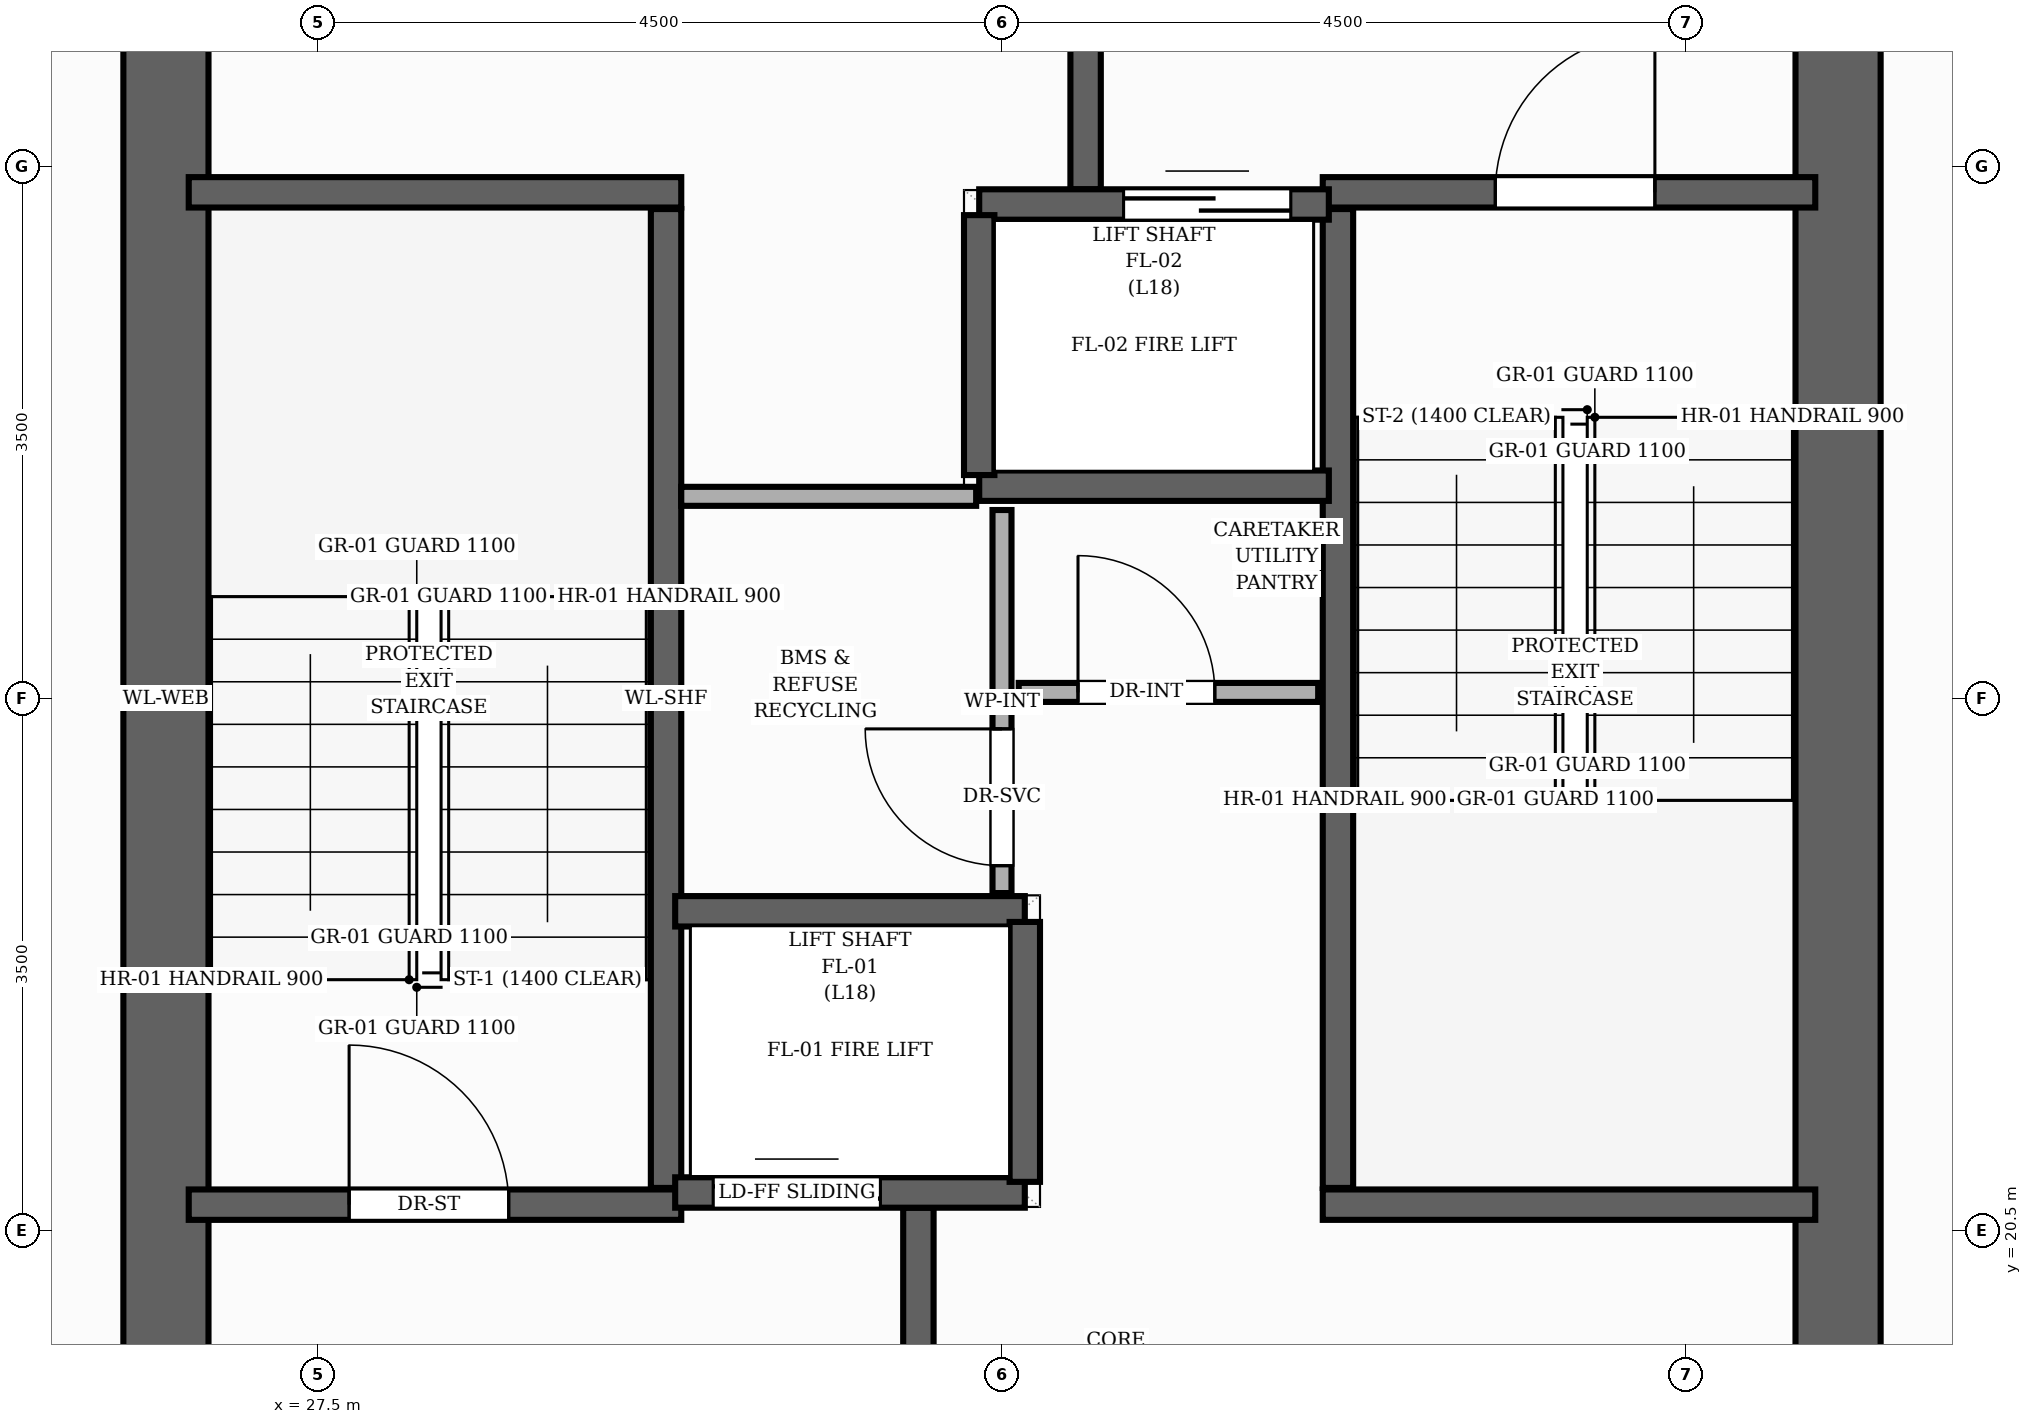
"""IFC4 building model, lengths in metres.
Left out: names, types, materials, properties, quantities, classifications, styles, units other than length and angle.
Written with IfcOpenShell. Run it as: python <this file> out.ifc"""

import sys

from ifc_helpers import new_model, si_unit, direction, frame, frame_2d, origin, place, context, subcontext, project, spatial, rectangle, extrude, element, fill, save


model = new_model("IFC4")
c1 = context("Model", 3, precision=1e-05, world=origin(), true_north=direction((0.0, 1.0)))
c2 = subcontext(c1, "Body", "Model", "MODEL_VIEW")
j1 = project(units=[si_unit("LENGTHUNIT", "METRE"), si_unit("PLANEANGLEUNIT", "RADIAN")], contexts=[c1])
p1 = place(None, origin())
s1 = spatial("IfcSite", under=j1, at=p1, CompositionType="ELEMENT")
p2 = place(p1, origin())
s2 = spatial("IfcBuilding", under=s1, at=p2, CompositionType="ELEMENT")
p3 = place(p2, frame((0.0, 0.0, 63.2)))
s3 = spatial("IfcBuildingStorey", under=s2, at=p3, CompositionType="ELEMENT", Elevation=63.2)
for number, where, z_axis, x_axis in (
    (1, (26.5, 17.4, 0.0), (0.0, 0.0, 1.0), (0.0, 1.0, 0.0)),
    (2, (37.5, 17.4, 0.0), (0.0, 0.0, 1.0), (0.0, 1.0, 0.0)),
):
    element("IfcWall", number, at=place(p3, frame(where, z_axis=z_axis, x_axis=x_axis)), inside=s3, PredefinedType="SHEAR", context=c2, shape_type="SweptSolid", body=[
        extrude(rectangle(XDim=13.2, YDim=0.56, at=frame_2d((6.6, 0.0))), origin(), (0.0, 0.0, 1.0), 3.2),
    ])
p4 = place(p3, frame((29.79, 20.78, 0.0), z_axis=(0.0, 0.0, 1.0), x_axis=(0.0, 1.0, 0.0)))
e3 = element("IfcWall", 3, at=p4, inside=s3, PredefinedType="SHEAR", context=c2, shape_type="SweptSolid", body=[
    extrude(rectangle(XDim=6.44, YDim=0.2, at=frame_2d((3.22, 0.0))), origin(), (0.0, 0.0, 1.0), 3.2),
])
p5 = place(p3, frame((26.65, 27.33, 0.0), z_axis=(0.0, 0.0, 1.0), x_axis=(1.0, 0.0, 0.0)))
e4 = element("IfcWall", 4, at=p5, inside=s3, PredefinedType="SHEAR", context=c2, shape_type="SweptSolid", body=[
    extrude(rectangle(XDim=3.24, YDim=0.2, at=frame_2d((1.62, 0.0))), origin(), (0.0, 0.0, 1.0), 3.2),
])
p6 = place(p3, frame((26.65, 20.67, 0.0), z_axis=(0.0, 0.0, 1.0), x_axis=(1.0, 0.0, 0.0)))
e5 = element("IfcWall", 5, at=p6, inside=s3, PredefinedType="SHEAR", context=c2, shape_type="SweptSolid", body=[
    extrude(rectangle(XDim=3.24, YDim=0.2, at=frame_2d((1.62, 0.0))), origin(), (0.0, 0.0, 1.0), 3.2),
])
p7 = place(p6, frame((1.055, 0.0, 0.0)))
e6 = element("IfcOpeningElement", 6, at=p7, cuts=e5, PredefinedType="OPENING", context=c2, shape_type="SweptSolid", body=[
    extrude(rectangle(XDim=1.05, YDim=2.15, at=frame_2d((0.525, 1.075))), frame((0.0, 0.11, 0.0), z_axis=(0.0, -1.0, 0.0), x_axis=(1.0, 0.0, 0.0)), (0.0, 0.0, 1.0), 0.22),
])
p8 = place(p3, frame((34.21, 20.78, 0.0), z_axis=(0.0, 0.0, 1.0), x_axis=(0.0, 1.0, 0.0)))
e7 = element("IfcWall", 7, at=p8, inside=s3, PredefinedType="SHEAR", context=c2, shape_type="SweptSolid", body=[
    extrude(rectangle(XDim=6.44, YDim=0.2, at=frame_2d((3.22, 0.0))), origin(), (0.0, 0.0, 1.0), 3.2),
])
p9 = place(p3, frame((34.11, 20.67, 0.0), z_axis=(0.0, 0.0, 1.0), x_axis=(1.0, 0.0, 0.0)))
e8 = element("IfcWall", 8, at=p9, inside=s3, PredefinedType="SHEAR", context=c2, shape_type="SweptSolid", body=[
    extrude(rectangle(XDim=3.24, YDim=0.2, at=frame_2d((1.62, 0.0))), origin(), (0.0, 0.0, 1.0), 3.2),
])
p10 = place(p3, frame((34.11, 27.33, 0.0), z_axis=(0.0, 0.0, 1.0), x_axis=(1.0, 0.0, 0.0)))
e9 = element("IfcWall", 9, at=p10, inside=s3, PredefinedType="SHEAR", context=c2, shape_type="SweptSolid", body=[
    extrude(rectangle(XDim=3.24, YDim=0.2, at=frame_2d((1.62, 0.0))), origin(), (0.0, 0.0, 1.0), 3.2),
])
p11 = place(p10, frame((1.135, 0.0, 0.0)))
e10 = element("IfcOpeningElement", 10, at=p11, cuts=e9, PredefinedType="OPENING", context=c2, shape_type="SweptSolid", body=[
    extrude(rectangle(XDim=1.05, YDim=2.15, at=frame_2d((0.525, 1.075))), frame((0.0, 0.11, 0.0), z_axis=(0.0, -1.0, 0.0), x_axis=(1.0, 0.0, 0.0)), (0.0, 0.0, 1.0), 0.22),
])
for number, where, z_axis, x_axis in (
    (11, (31.45, 17.15, 0.0), (0.0, 0.0, 1.0), (0.0, 1.0, 0.0)),
    (12, (32.55, 27.35, 0.0), (0.0, 0.0, 1.0), (0.0, 1.0, 0.0)),
):
    element("IfcWall", number, at=place(p3, frame(where, z_axis=z_axis, x_axis=x_axis)), inside=s3, PredefinedType="SHEAR", context=c2, shape_type="SweptSolid", body=[
        extrude(rectangle(XDim=3.5, YDim=0.2, at=frame_2d((1.75, 0.0))), origin(), (0.0, 0.0, 1.0), 3.2),
    ])
p12 = place(p3, frame((29.85, 20.75, 0.0), z_axis=(0.0, 0.0, 1.0), x_axis=(1.0, 0.0, 0.0)))
e13 = element("IfcWall", 13, at=p12, inside=s3, PredefinedType="SHEAR", context=c2, shape_type="SweptSolid", body=[
    extrude(rectangle(XDim=2.3, YDim=0.2, at=frame_2d((1.15, 0.0))), origin(), (0.0, 0.0, 1.0), 3.2),
])
p13 = place(p12, frame((0.25, 0.0, 0.0)))
e14 = element("IfcOpeningElement", 14, at=p13, cuts=e13, PredefinedType="OPENING", context=c2, shape_type="SweptSolid", body=[
    extrude(rectangle(XDim=1.1, YDim=2.15, at=frame_2d((0.55, 1.075))), frame((0.0, 0.11, 0.0), z_axis=(0.0, -1.0, 0.0), x_axis=(1.0, 0.0, 0.0)), (0.0, 0.0, 1.0), 0.22),
])
p14 = place(p3, frame((29.85, 22.6, 0.0), z_axis=(0.0, 0.0, 1.0), x_axis=(1.0, 0.0, 0.0)))
e15 = element("IfcWall", 15, at=p14, inside=s3, PredefinedType="SHEAR", context=c2, shape_type="SweptSolid", body=[
    extrude(rectangle(XDim=2.3, YDim=0.2, at=frame_2d((1.15, 0.0))), origin(), (0.0, 0.0, 1.0), 3.2),
])
p15 = place(p3, frame((32.15, 20.82, 0.0), z_axis=(0.0, 0.0, 1.0), x_axis=(0.0, 1.0, 0.0)))
e16 = element("IfcWall", 16, at=p15, inside=s3, PredefinedType="SHEAR", context=c2, shape_type="SweptSolid", body=[
    extrude(rectangle(XDim=1.71, YDim=0.2, at=frame_2d((0.855, 0.0))), origin(), (0.0, 0.0, 1.0), 3.2),
])
p16 = place(p3, frame((31.85, 27.25, 0.0), z_axis=(0.0, 0.0, 1.0), x_axis=(1.0, 0.0, 0.0)))
e17 = element("IfcWall", 17, at=p16, inside=s3, PredefinedType="SHEAR", context=c2, shape_type="SweptSolid", body=[
    extrude(rectangle(XDim=2.3, YDim=0.2, at=frame_2d((1.15, 0.0))), origin(), (0.0, 0.0, 1.0), 3.2),
])
p17 = place(p16, frame((0.95, 0.0, 0.0)))
e18 = element("IfcOpeningElement", 18, at=p17, cuts=e17, PredefinedType="OPENING", context=c2, shape_type="SweptSolid", body=[
    extrude(rectangle(XDim=1.1, YDim=2.15, at=frame_2d((0.55, 1.075))), frame((0.0, 0.11, 0.0), z_axis=(0.0, -1.0, 0.0), x_axis=(1.0, 0.0, 0.0)), (0.0, 0.0, 1.0), 0.22),
])
p18 = place(p3, frame((31.85, 25.4, 0.0), z_axis=(0.0, 0.0, 1.0), x_axis=(1.0, 0.0, 0.0)))
e19 = element("IfcWall", 19, at=p18, inside=s3, PredefinedType="SHEAR", context=c2, shape_type="SweptSolid", body=[
    extrude(rectangle(XDim=2.3, YDim=0.2, at=frame_2d((1.15, 0.0))), origin(), (0.0, 0.0, 1.0), 3.2),
])
p19 = place(p3, frame((31.85, 25.47, 0.0), z_axis=(0.0, 0.0, 1.0), x_axis=(0.0, 1.0, 0.0)))
e20 = element("IfcWall", 20, at=p19, inside=s3, PredefinedType="SHEAR", context=c2, shape_type="SweptSolid", body=[
    extrude(rectangle(XDim=1.71, YDim=0.2, at=frame_2d((0.855, 0.0))), origin(), (0.0, 0.0, 1.0), 3.2),
])
p20 = place(p3, frame((32.0, 22.72, 0.0), z_axis=(0.0, 0.0, 1.0), x_axis=(0.0, 1.0, 0.0)))
e21 = element("IfcWall", 21, at=p20, inside=s3, PredefinedType="PARTITIONING", context=c2, shape_type="SweptSolid", body=[
    extrude(rectangle(XDim=2.52, YDim=0.125, at=frame_2d((1.26, 0.0))), origin(), (0.0, 0.0, 1.0), 2.795),
])
p21 = place(p20, frame((0.18, 0.0, 0.0)))
e22 = element("IfcOpeningElement", 22, at=p21, cuts=e21, PredefinedType="OPENING", context=c2, shape_type="SweptSolid", body=[
    extrude(rectangle(XDim=0.9, YDim=2.1, at=frame_2d((0.45, 1.05))), frame((0.0, 0.073, 0.0), z_axis=(0.0, -1.0, 0.0), x_axis=(1.0, 0.0, 0.0)), (0.0, 0.0, 1.0), 0.145),
])
p22 = place(p3, frame((32.11, 24.04, 0.0), z_axis=(0.0, 0.0, 1.0), x_axis=(1.0, 0.0, 0.0)))
e23 = element("IfcWall", 23, at=p22, inside=s3, PredefinedType="PARTITIONING", context=c2, shape_type="SweptSolid", body=[
    extrude(rectangle(XDim=1.97, YDim=0.125, at=frame_2d((0.985, 0.0))), origin(), (0.0, 0.0, 1.0), 2.795),
])
p23 = place(p22, frame((0.39, 0.0, 0.0)))
e24 = element("IfcOpeningElement", 24, at=p23, cuts=e23, PredefinedType="OPENING", context=c2, shape_type="SweptSolid", body=[
    extrude(rectangle(XDim=0.9, YDim=2.1, at=frame_2d((0.45, 1.05))), frame((0.0, 0.073, 0.0), z_axis=(0.0, -1.0, 0.0), x_axis=(1.0, 0.0, 0.0)), (0.0, 0.0, 1.0), 0.145),
])
p24 = place(p3, frame((29.89, 25.33, 0.0), z_axis=(0.0, 0.0, 1.0), x_axis=(1.0, 0.0, 0.0)))
e25 = element("IfcWall", 25, at=p24, inside=s3, PredefinedType="PARTITIONING", context=c2, shape_type="SweptSolid", body=[
    extrude(rectangle(XDim=1.94, YDim=0.125, at=frame_2d((0.97, 0.0))), origin(), (0.0, 0.0, 1.0), 2.795),
])
p25 = place(p7, origin())
e26 = element("IfcDoor", 26, at=p25, inside=s3, OperationType="SINGLE_SWING_LEFT", PredefinedType="DOOR", context=c2, shape_type="SweptSolid", body=[
    extrude(rectangle(XDim=1.05, YDim=2.15, at=frame_2d((0.525, 1.075))), frame((0.0, 0.025, 0.0), z_axis=(0.0, -1.0, 0.0), x_axis=(1.0, 0.0, 0.0)), (0.0, 0.0, 1.0), 0.05),
])
fill(e6, e26)
p26 = place(p11, origin())
e27 = element("IfcDoor", 27, at=p26, inside=s3, OperationType="SINGLE_SWING_RIGHT", PredefinedType="DOOR", context=c2, shape_type="SweptSolid", body=[
    extrude(rectangle(XDim=1.05, YDim=2.15, at=frame_2d((0.525, 1.075))), frame((0.0, 0.025, 0.0), z_axis=(0.0, -1.0, 0.0), x_axis=(1.0, 0.0, 0.0)), (0.0, 0.0, 1.0), 0.05),
])
fill(e10, e27)
p27 = place(p13, origin())
e28 = element("IfcDoor", 28, at=p27, inside=s3, OperationType="DOUBLE_DOOR_SLIDING", PredefinedType="DOOR", context=c2, shape_type="SweptSolid", body=[
    extrude(rectangle(XDim=1.1, YDim=2.15, at=frame_2d((0.55, 1.075))), frame((0.0, 0.025, 0.0), z_axis=(0.0, -1.0, 0.0), x_axis=(1.0, 0.0, 0.0)), (0.0, 0.0, 1.0), 0.05),
])
fill(e14, e28)
p28 = place(p17, origin())
e29 = element("IfcDoor", 29, at=p28, inside=s3, OperationType="DOUBLE_DOOR_SLIDING", PredefinedType="DOOR", context=c2, shape_type="SweptSolid", body=[
    extrude(rectangle(XDim=1.1, YDim=2.15, at=frame_2d((0.55, 1.075))), frame((0.0, 0.025, 0.0), z_axis=(0.0, -1.0, 0.0), x_axis=(1.0, 0.0, 0.0)), (0.0, 0.0, 1.0), 0.05),
])
fill(e18, e29)
p29 = place(p23, origin())
e30 = element("IfcDoor", 30, at=p29, inside=s3, OperationType="SINGLE_SWING_LEFT", PredefinedType="DOOR", context=c2, shape_type="SweptSolid", body=[
    extrude(rectangle(XDim=0.9, YDim=2.1, at=frame_2d((0.45, 1.05))), frame((0.0, 0.025, 0.0), z_axis=(0.0, -1.0, 0.0), x_axis=(1.0, 0.0, 0.0)), (0.0, 0.0, 1.0), 0.05),
])
fill(e24, e30)
p30 = place(p21, origin())
e31 = element("IfcDoor", 31, at=p30, inside=s3, OperationType="SINGLE_SWING_RIGHT", PredefinedType="DOOR", context=c2, shape_type="SweptSolid", body=[
    extrude(rectangle(XDim=0.9, YDim=2.1, at=frame_2d((0.45, 1.05))), frame((0.0, 0.025, 0.0), z_axis=(0.0, -1.0, 0.0), x_axis=(1.0, 0.0, 0.0)), (0.0, 0.0, 1.0), 0.05),
])
fill(e22, e31)
save(model, sys.argv[1])
